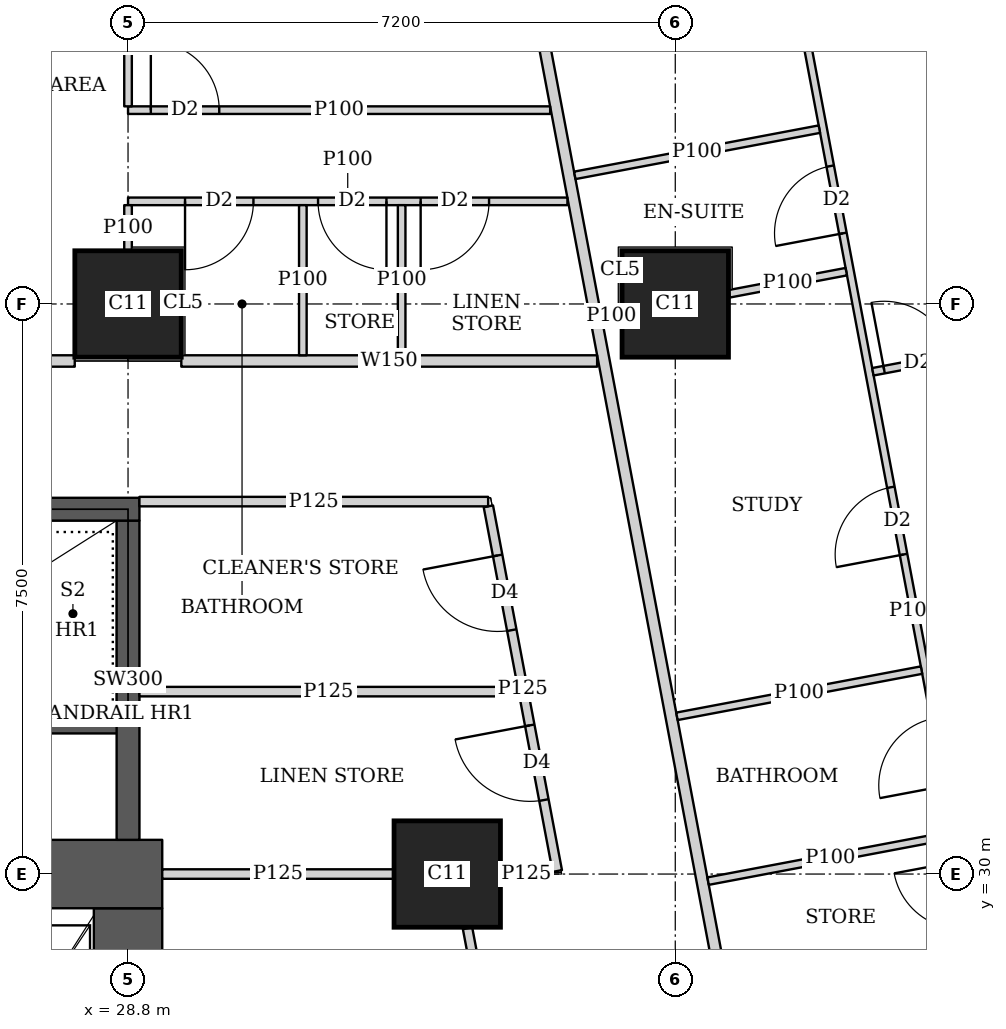
"""IFC4 building model, lengths in metres.
Left out: names, types, materials, properties, quantities, classifications, styles, units other than length and angle.
Written with IfcOpenShell. Run it as: python <this file> out.ifc"""

import sys

from ifc_helpers import new_model, si_unit, direction, frame, frame_2d, origin, origin_2d, place, context, subcontext, project, spatial, rectangle, extrude, element, fill, save


model = new_model("IFC4")
c1 = context("Model", 3, precision=1e-05, world=origin(), true_north=direction((0.0, 1.0)))
c2 = subcontext(c1, "Body", "Model", "MODEL_VIEW")
j1 = project(units=[si_unit("LENGTHUNIT", "METRE"), si_unit("PLANEANGLEUNIT", "RADIAN")], contexts=[c1])
p1 = place(None, origin())
s1 = spatial("IfcSite", under=j1, at=p1, CompositionType="ELEMENT")
p2 = place(p1, origin())
s2 = spatial("IfcBuilding", under=s1, at=p2, CompositionType="ELEMENT")
p3 = place(p2, frame((0.0, 0.0, 289.1)))
s3 = spatial("IfcBuildingStorey", under=s2, at=p3, CompositionType="ELEMENT", Elevation=289.1)
for number, where, z_axis, x_axis in (
    (1, (33.0, 30.0, 0.0), (0.0, 0.0, 1.0), (1.0, 0.0, 0.0)),
    (2, (28.8, 37.5, 0.0), (0.0, 0.0, 1.0), (1.0, 0.0, 0.0)),
    (3, (36.0, 37.5, 0.0), (0.0, 0.0, 1.0), (1.0, 0.0, 0.0)),
):
    element("IfcColumn", number, at=place(p3, frame(where, z_axis=z_axis, x_axis=x_axis)), inside=s3, PredefinedType="COLUMN", context=c2, shape_type="SweptSolid", body=[
        extrude(rectangle(XDim=1.4, YDim=1.4, at=origin_2d()), origin(), (0.0, 0.0, 1.0), 3.75),
    ])
p4 = place(p3, frame((13.95, 30.0, 0.0), z_axis=(0.0, 0.0, 1.0), x_axis=(1.0, 0.0, 0.0)))
e4 = element("IfcWall", 4, at=p4, inside=s3, PredefinedType="SHEAR", context=c2, shape_type="SweptSolid", body=[
    extrude(rectangle(XDim=15.3, YDim=0.9, at=frame_2d((7.65, 0.0))), origin(), (0.0, 0.0, 1.0), 3.75),
])
p5 = place(p4, frame((4.45, 0.0, 0.0)))
e5 = element("IfcOpeningElement", 5, at=p5, cuts=e4, PredefinedType="OPENING", context=c2, shape_type="SweptSolid", body=[
    extrude(rectangle(XDim=1.8, YDim=2.1, at=frame_2d((0.9, 1.05))), frame((0.0, 0.46, 0.0), z_axis=(0.0, -1.0, 0.0), x_axis=(1.0, 0.0, 0.0)), (0.0, 0.0, 1.0), 0.92),
])
p6 = place(p4, frame((10.7, 0.0, 0.0)))
e6 = element("IfcOpeningElement", 6, at=p6, cuts=e4, PredefinedType="OPENING", context=c2, shape_type="SweptSolid", body=[
    extrude(rectangle(XDim=1.1, YDim=2.1, at=frame_2d((0.55, 1.05))), frame((0.0, 0.46, 0.0), z_axis=(0.0, -1.0, 0.0), x_axis=(1.0, 0.0, 0.0)), (0.0, 0.0, 1.0), 0.92),
])
p7 = place(p3, frame((28.8, 15.45, 0.0), z_axis=(0.0, 0.0, 1.0), x_axis=(0.0, 1.0, 0.0)))
e7 = element("IfcWall", 7, at=p7, inside=s3, PredefinedType="SHEAR", context=c2, shape_type="SweptSolid", body=[
    extrude(rectangle(XDim=14.1, YDim=0.9, at=frame_2d((7.05, 0.0))), origin(), (0.0, 0.0, 1.0), 3.75),
])
p8 = place(p3, frame((21.45, 34.8, 0.0), z_axis=(0.0, 0.0, 1.0), x_axis=(1.0, 0.0, 0.0)))
e8 = element("IfcWall", 8, at=p8, inside=s3, PredefinedType="SHEAR", context=c2, shape_type="SweptSolid", body=[
    extrude(rectangle(XDim=7.5, YDim=0.3, at=frame_2d((3.75, 0.0))), origin(), (0.0, 0.0, 1.0), 3.75),
])
p9 = place(p8, frame((0.5, 0.0, 0.0)))
e9 = element("IfcOpeningElement", 9, at=p9, cuts=e8, PredefinedType="OPENING", context=c2, shape_type="SweptSolid", body=[
    extrude(rectangle(XDim=1.1, YDim=2.1, at=frame_2d((0.55, 1.05))), frame((0.0, 0.16, 0.0), z_axis=(0.0, -1.0, 0.0), x_axis=(1.0, 0.0, 0.0)), (0.0, 0.0, 1.0), 0.32),
])
p10 = place(p3, frame((28.8, 30.45, 0.0), z_axis=(0.0, 0.0, 1.0), x_axis=(0.0, 1.0, 0.0)))
e10 = element("IfcWall", 10, at=p10, inside=s3, PredefinedType="SHEAR", context=c2, shape_type="SweptSolid", body=[
    extrude(rectangle(XDim=4.2, YDim=0.3, at=frame_2d((2.1, 0.0))), origin(), (0.0, 0.0, 1.0), 3.75),
])
p11 = place(p3, frame((22.301, 36.75, 0.0), z_axis=(0.0, 0.0, 1.0), x_axis=(1.0, 0.0, 0.0)))
e11 = element("IfcWall", 11, at=p11, inside=s3, PredefinedType="SOLIDWALL", context=c2, shape_type="SweptSolid", body=[
    extrude(rectangle(XDim=5.798, YDim=0.15, at=frame_2d((2.899, 0.0))), origin(), (0.0, 0.0, 1.0), 3.5),
])
p12 = place(p11, frame((4.199, 0.0, 0.0)))
e12 = element("IfcOpeningElement", 12, at=p12, cuts=e11, PredefinedType="OPENING", context=c2, shape_type="SweptSolid", body=[
    extrude(rectangle(XDim=1.0, YDim=2.1, at=frame_2d((0.5, 1.05))), frame((0.0, 0.085, 0.0), z_axis=(0.0, -1.0, 0.0), x_axis=(1.0, 0.0, 0.0)), (0.0, 0.0, 1.0), 0.17),
])
p13 = place(p3, frame((29.501, 36.75, 0.0), z_axis=(0.0, 0.0, 1.0), x_axis=(1.0, 0.0, 0.0)))
e13 = element("IfcWall", 13, at=p13, inside=s3, PredefinedType="SOLIDWALL", context=c2, shape_type="SweptSolid", body=[
    extrude(rectangle(XDim=5.471, YDim=0.15, at=frame_2d((2.735, 0.0))), origin(), (0.0, 0.0, 1.0), 3.5),
])
p14 = place(p3, frame((34.036, 42.186, 0.0), z_axis=(0.0, 0.0, 1.0), x_axis=(0.185593518645, -0.9826266055, 0.0)))
e14 = element("IfcWall", 14, at=p14, inside=s3, PredefinedType="SOLIDWALL", context=c2, shape_type="SweptSolid", body=[
    extrude(rectangle(XDim=35.961, YDim=0.15, at=frame_2d((17.98, 0.0))), origin(), (0.0, 0.0, 1.0), 2.5),
])
p15 = place(p14, frame((19.345, 0.0, 0.0)))
e15 = element("IfcOpeningElement", 15, at=p15, cuts=e14, PredefinedType="OPENING", context=c2, shape_type="SweptSolid", body=[
    extrude(rectangle(XDim=1.0, YDim=2.1, at=frame_2d((0.5, 1.05))), frame((0.0, 0.085, 0.0), z_axis=(0.0, -1.0, 0.0), x_axis=(1.0, 0.0, 0.0)), (0.0, 0.0, 1.0), 0.17),
])
p16 = place(p14, frame((33.774, 0.0, 0.0)))
e16 = element("IfcOpeningElement", 16, at=p16, cuts=e14, PredefinedType="OPENING", context=c2, shape_type="SweptSolid", body=[
    extrude(rectangle(XDim=1.0, YDim=2.1, at=frame_2d((0.5, 1.05))), frame((0.0, 0.085, 0.0), z_axis=(0.0, -1.0, 0.0), x_axis=(1.0, 0.0, 0.0)), (0.0, 0.0, 1.0), 0.17),
])
p17 = place(p3, frame((41.054, 37.072, 0.0), z_axis=(0.0, 0.0, 1.0), x_axis=(-0.982579896219, -0.185840650951, 0.0)))
e17 = element("IfcWall", 17, at=p17, inside=s3, PredefinedType="PARTITIONING", context=c2, shape_type="SweptSolid", body=[
    extrude(rectangle(XDim=2.497, YDim=0.1, at=frame_2d((1.249, 0.0))), origin(), (0.0, 0.0, 1.0), 3.5),
])
p18 = place(p17, frame((1.447, 0.0, 0.0)))
e18 = element("IfcOpeningElement", 18, at=p18, cuts=e17, PredefinedType="OPENING", context=c2, shape_type="SweptSolid", body=[
    extrude(rectangle(XDim=0.9, YDim=2.1, at=frame_2d((0.45, 1.05))), frame((0.0, 0.06, 0.0), z_axis=(0.0, -1.0, 0.0), x_axis=(1.0, 0.0, 0.0)), (0.0, 0.0, 1.0), 0.12),
])
p19 = place(p3, frame((37.896, 39.8, 0.0), z_axis=(0.0, 0.0, 1.0), x_axis=(-0.982607026909, -0.185697147715, 0.0)))
e19 = element("IfcWall", 19, at=p19, inside=s3, PredefinedType="PARTITIONING", context=c2, shape_type="SweptSolid", body=[
    extrude(rectangle(XDim=3.275, YDim=0.1, at=frame_2d((1.637, 0.0))), origin(), (0.0, 0.0, 1.0), 3.5),
])
p20 = place(p3, frame((38.25, 37.925, 0.0), z_axis=(0.0, 0.0, 1.0), x_axis=(-0.982610209589, -0.185680305934, 0.0)))
e20 = element("IfcWall", 20, at=p20, inside=s3, PredefinedType="PARTITIONING", context=c2, shape_type="SweptSolid", body=[
    extrude(rectangle(XDim=1.567, YDim=0.1, at=frame_2d((0.784, 0.0))), origin(), (0.0, 0.0, 1.0), 3.5),
])
p21 = place(p3, frame((35.29, 37.366, 0.0), z_axis=(0.0, 0.0, 1.0), x_axis=(-0.982395465615, -0.18681313963, 0.0)))
e21 = element("IfcWall", 21, at=p21, inside=s3, PredefinedType="PARTITIONING", context=c2, shape_type="SweptSolid", body=[
    extrude(rectangle(XDim=0.263, YDim=0.1, at=frame_2d((0.131, 0.0))), origin(), (0.0, 0.0, 1.0), 3.5),
])
p22 = place(p3, frame((39.24, 32.683, 0.0), z_axis=(0.0, 0.0, 1.0), x_axis=(-0.982607026909, -0.185697147715, 0.0)))
e22 = element("IfcWall", 22, at=p22, inside=s3, PredefinedType="PARTITIONING", context=c2, shape_type="SweptSolid", body=[
    extrude(rectangle(XDim=3.275, YDim=0.1, at=frame_2d((1.637, 0.0))), origin(), (0.0, 0.0, 1.0), 3.5),
])
p23 = place(p3, frame((39.649, 30.515, 0.0), z_axis=(0.0, 0.0, 1.0), x_axis=(-0.982610347627, -0.185679575441, 0.0)))
e23 = element("IfcWall", 23, at=p23, inside=s3, PredefinedType="PARTITIONING", context=c2, shape_type="SweptSolid", body=[
    extrude(rectangle(XDim=3.274, YDim=0.1, at=frame_2d((1.637, 0.0))), origin(), (0.0, 0.0, 1.0), 2.5),
])
p24 = place(p3, frame((37.591, 41.685, 0.0), z_axis=(0.0, 0.0, 1.0), x_axis=(0.185541820726, -0.982636368532, 0.0)))
e24 = element("IfcWall", 24, at=p24, inside=s3, PredefinedType="PARTITIONING", context=c2, shape_type="SweptSolid", body=[
    extrude(rectangle(XDim=16.735, YDim=0.1, at=frame_2d((8.367, 0.0))), origin(), (0.0, 0.0, 1.0), 2.5),
])
p25 = place(p24, frame((2.413, 0.0, 0.0)))
e25 = element("IfcOpeningElement", 25, at=p25, cuts=e24, PredefinedType="OPENING", context=c2, shape_type="SweptSolid", body=[
    extrude(rectangle(XDim=0.9, YDim=2.1, at=frame_2d((0.45, 1.05))), frame((0.0, 0.06, 0.0), z_axis=(0.0, -1.0, 0.0), x_axis=(1.0, 0.0, 0.0)), (0.0, 0.0, 1.0), 0.12),
])
p26 = place(p24, frame((6.713, 0.0, 0.0)))
e26 = element("IfcOpeningElement", 26, at=p26, cuts=e24, PredefinedType="OPENING", context=c2, shape_type="SweptSolid", body=[
    extrude(rectangle(XDim=0.9, YDim=2.1, at=frame_2d((0.45, 1.05))), frame((0.0, 0.06, 0.0), z_axis=(0.0, -1.0, 0.0), x_axis=(1.0, 0.0, 0.0)), (0.0, 0.0, 1.0), 0.12),
])
p27 = place(p24, frame((9.805, 0.0, 0.0)))
e27 = element("IfcOpeningElement", 27, at=p27, cuts=e24, PredefinedType="OPENING", context=c2, shape_type="SweptSolid", body=[
    extrude(rectangle(XDim=0.9, YDim=2.1, at=frame_2d((0.45, 1.05))), frame((0.0, 0.06, 0.0), z_axis=(0.0, -1.0, 0.0), x_axis=(1.0, 0.0, 0.0)), (0.0, 0.0, 1.0), 0.12),
])
p28 = place(p24, frame((11.713, 0.0, 0.0)))
e28 = element("IfcOpeningElement", 28, at=p28, cuts=e24, PredefinedType="OPENING", context=c2, shape_type="SweptSolid", body=[
    extrude(rectangle(XDim=0.9, YDim=2.1, at=frame_2d((0.45, 1.05))), frame((0.0, 0.06, 0.0), z_axis=(0.0, -1.0, 0.0), x_axis=(1.0, 0.0, 0.0)), (0.0, 0.0, 1.0), 0.12),
])
p29 = place(p24, frame((14.426, 0.0, 0.0)))
e29 = element("IfcOpeningElement", 29, at=p29, cuts=e24, PredefinedType="OPENING", context=c2, shape_type="SweptSolid", body=[
    extrude(rectangle(XDim=0.9, YDim=2.1, at=frame_2d((0.45, 1.05))), frame((0.0, 0.06, 0.0), z_axis=(0.0, -1.0, 0.0), x_axis=(1.0, 0.0, 0.0)), (0.0, 0.0, 1.0), 0.12),
])
p30 = place(p3, frame((28.8, 40.1, 0.0), z_axis=(0.0, 0.0, 1.0), x_axis=(0.0, 1.0, 0.0)))
e30 = element("IfcWall", 30, at=p30, inside=s3, PredefinedType="PARTITIONING", context=c2, shape_type="SweptSolid", body=[
    extrude(rectangle(XDim=1.699, YDim=0.1, at=frame_2d((0.85, 0.0))), origin(), (0.0, 0.0, 1.0), 3.5),
])
p31 = place(p3, frame((28.8, 38.201, 0.0), z_axis=(0.0, 0.0, 1.0), x_axis=(0.0, 1.0, 0.0)))
e31 = element("IfcWall", 31, at=p31, inside=s3, PredefinedType="PARTITIONING", context=c2, shape_type="SweptSolid", body=[
    extrude(rectangle(XDim=0.599, YDim=0.1, at=frame_2d((0.3, 0.0))), origin(), (0.0, 0.0, 1.0), 3.5),
])
for number, where, z_axis, x_axis in (
    (32, (32.4, 36.825, 0.0), (0.0, 0.0, 1.0), (0.0, 1.0, 0.0)),
    (33, (31.1, 36.825, 0.0), (0.0, 0.0, 1.0), (0.0, 1.0, 0.0)),
):
    element("IfcWall", number, at=place(p3, frame(where, z_axis=z_axis, x_axis=x_axis)), inside=s3, PredefinedType="PARTITIONING", context=c2, shape_type="SweptSolid", body=[
        extrude(rectangle(XDim=1.975, YDim=0.1, at=frame_2d((0.988, 0.0))), origin(), (0.0, 0.0, 1.0), 3.5),
    ])
p32 = place(p3, frame((28.8, 38.85, 0.0), z_axis=(0.0, 0.0, 1.0), x_axis=(1.0, 0.0, 0.0)))
e34 = element("IfcWall", 34, at=p32, inside=s3, PredefinedType="PARTITIONING", context=c2, shape_type="SweptSolid", body=[
    extrude(rectangle(XDim=5.781, YDim=0.1, at=frame_2d((2.891, 0.0))), origin(), (0.0, 0.0, 1.0), 3.5),
])
p33 = place(p32, frame((0.75, 0.0, 0.0)))
e35 = element("IfcOpeningElement", 35, at=p33, cuts=e34, PredefinedType="OPENING", context=c2, shape_type="SweptSolid", body=[
    extrude(rectangle(XDim=0.9, YDim=2.1, at=frame_2d((0.45, 1.05))), frame((0.0, 0.06, 0.0), z_axis=(0.0, -1.0, 0.0), x_axis=(1.0, 0.0, 0.0)), (0.0, 0.0, 1.0), 0.12),
])
p34 = place(p32, frame((2.5, 0.0, 0.0)))
e36 = element("IfcOpeningElement", 36, at=p34, cuts=e34, PredefinedType="OPENING", context=c2, shape_type="SweptSolid", body=[
    extrude(rectangle(XDim=0.9, YDim=2.1, at=frame_2d((0.45, 1.05))), frame((0.0, 0.06, 0.0), z_axis=(0.0, -1.0, 0.0), x_axis=(1.0, 0.0, 0.0)), (0.0, 0.0, 1.0), 0.12),
])
p35 = place(p32, frame((3.85, 0.0, 0.0)))
e37 = element("IfcOpeningElement", 37, at=p35, cuts=e34, PredefinedType="OPENING", context=c2, shape_type="SweptSolid", body=[
    extrude(rectangle(XDim=0.9, YDim=2.1, at=frame_2d((0.45, 1.05))), frame((0.0, 0.06, 0.0), z_axis=(0.0, -1.0, 0.0), x_axis=(1.0, 0.0, 0.0)), (0.0, 0.0, 1.0), 0.12),
])
p36 = place(p3, frame((28.8, 40.05, 0.0), z_axis=(0.0, 0.0, 1.0), x_axis=(1.0, 0.0, 0.0)))
e38 = element("IfcWall", 38, at=p36, inside=s3, PredefinedType="PARTITIONING", context=c2, shape_type="SweptSolid", body=[
    extrude(rectangle(XDim=5.554, YDim=0.1, at=frame_2d((2.777, 0.0))), origin(), (0.0, 0.0, 1.0), 3.5),
])
p37 = place(p36, frame((0.3, 0.0, 0.0)))
e39 = element("IfcOpeningElement", 39, at=p37, cuts=e38, PredefinedType="OPENING", context=c2, shape_type="SweptSolid", body=[
    extrude(rectangle(XDim=0.9, YDim=2.1, at=frame_2d((0.45, 1.05))), frame((0.0, 0.06, 0.0), z_axis=(0.0, -1.0, 0.0), x_axis=(1.0, 0.0, 0.0)), (0.0, 0.0, 1.0), 0.12),
])
p38 = place(p3, frame((28.95, 34.9, 0.0), z_axis=(0.0, 0.0, 1.0), x_axis=(1.0, 0.0, 0.0)))
e40 = element("IfcWall", 40, at=p38, inside=s3, PredefinedType="PARTITIONING", context=c2, shape_type="SweptSolid", body=[
    extrude(rectangle(XDim=4.588, YDim=0.125, at=frame_2d((2.294, 0.0))), origin(), (0.0, 0.0, 1.0), 3.5),
])
p39 = place(p3, frame((34.448, 30.04, 0.0), z_axis=(0.0, 0.0, 1.0), x_axis=(-0.185749459238, 0.982597139418, 0.0)))
e41 = element("IfcWall", 41, at=p39, inside=s3, PredefinedType="PARTITIONING", context=c2, shape_type="SweptSolid", body=[
    extrude(rectangle(XDim=4.883, YDim=0.125, at=frame_2d((2.441, 0.0))), origin(), (0.0, 0.0, 1.0), 2.5),
])
p40 = place(p39, frame((0.95, 0.0, 0.0)))
e42 = element("IfcOpeningElement", 42, at=p40, cuts=e41, PredefinedType="OPENING", context=c2, shape_type="SweptSolid", body=[
    extrude(rectangle(XDim=1.0, YDim=2.1, at=frame_2d((0.5, 1.05))), frame((0.0, 0.073, 0.0), z_axis=(0.0, -1.0, 0.0), x_axis=(1.0, 0.0, 0.0)), (0.0, 0.0, 1.0), 0.145),
])
p41 = place(p39, frame((3.225, 0.0, 0.0)))
e43 = element("IfcOpeningElement", 43, at=p41, cuts=e41, PredefinedType="OPENING", context=c2, shape_type="SweptSolid", body=[
    extrude(rectangle(XDim=1.0, YDim=2.1, at=frame_2d((0.5, 1.05))), frame((0.0, 0.073, 0.0), z_axis=(0.0, -1.0, 0.0), x_axis=(1.0, 0.0, 0.0)), (0.0, 0.0, 1.0), 0.145),
])
p42 = place(p3, frame((35.83, 15.713, 0.0), z_axis=(0.0, 0.0, 1.0), x_axis=(-0.185534724166, 0.982637708481, 0.0)))
e44 = element("IfcWall", 44, at=p42, inside=s3, PredefinedType="PARTITIONING", context=c2, shape_type="SweptSolid", body=[
    extrude(rectangle(XDim=13.814, YDim=0.125, at=frame_2d((6.907, 0.0))), origin(), (0.0, 0.0, 1.0), 2.5),
])
p43 = place(p42, frame((5.35, 0.0, 0.0)))
e45 = element("IfcOpeningElement", 45, at=p43, cuts=e44, PredefinedType="OPENING", context=c2, shape_type="SweptSolid", body=[
    extrude(rectangle(XDim=1.0, YDim=2.1, at=frame_2d((0.5, 1.05))), frame((0.0, 0.073, 0.0), z_axis=(0.0, -1.0, 0.0), x_axis=(1.0, 0.0, 0.0)), (0.0, 0.0, 1.0), 0.145),
])
p44 = place(p3, frame((29.25, 30.0, 0.0), z_axis=(0.0, 0.0, 1.0), x_axis=(1.0, 0.0, 0.0)))
e46 = element("IfcWall", 46, at=p44, inside=s3, PredefinedType="PARTITIONING", context=c2, shape_type="SweptSolid", body=[
    extrude(rectangle(XDim=3.049, YDim=0.125, at=frame_2d((1.524, 0.0))), origin(), (0.0, 0.0, 1.0), 3.5),
])
p45 = place(p3, frame((33.701, 30.0, 0.0), z_axis=(0.0, 0.0, 1.0), x_axis=(1.0, 0.0, 0.0)))
e47 = element("IfcWall", 47, at=p45, inside=s3, PredefinedType="PARTITIONING", context=c2, shape_type="SweptSolid", body=[
    extrude(rectangle(XDim=0.679, YDim=0.125, at=frame_2d((0.339, 0.0))), origin(), (0.0, 0.0, 1.0), 2.5),
])
p46 = place(p3, frame((28.95, 32.4, 0.0), z_axis=(0.0, 0.0, 1.0), x_axis=(1.0, 0.0, 0.0)))
e48 = element("IfcWall", 48, at=p46, inside=s3, PredefinedType="PARTITIONING", context=c2, shape_type="SweptSolid", body=[
    extrude(rectangle(XDim=4.976, YDim=0.125, at=frame_2d((2.488, 0.0))), origin(), (0.0, 0.0, 1.0), 3.5),
])
p47 = place(p3, frame((23.0, 31.95, 0.0), z_axis=(0.0, 0.0, 1.0), x_axis=(1.0, 0.0, 0.0)))
e49 = element("IfcWall", 49, at=p47, inside=s3, PredefinedType="SHEAR", context=c2, shape_type="SweptSolid", body=[
    extrude(rectangle(XDim=5.8, YDim=0.2, at=frame_2d((2.9, 0.0))), origin(), (0.0, 0.0, 1.0), 3.75),
])
p48 = place(p18, origin())
e50 = element("IfcDoor", 50, at=p48, inside=s3, OperationType="SINGLE_SWING_LEFT", PredefinedType="DOOR", context=c2, shape_type="SweptSolid", body=[
    extrude(rectangle(XDim=0.9, YDim=2.1, at=frame_2d((0.45, 1.05))), frame((0.0, 0.025, 0.0), z_axis=(0.0, -1.0, 0.0), x_axis=(1.0, 0.0, 0.0)), (0.0, 0.0, 1.0), 0.05),
])
fill(e18, e50)
p49 = place(p25, origin())
e51 = element("IfcDoor", 51, at=p49, inside=s3, OperationType="SINGLE_SWING_LEFT", PredefinedType="DOOR", context=c2, shape_type="SweptSolid", body=[
    extrude(rectangle(XDim=0.9, YDim=2.1, at=frame_2d((0.45, 1.05))), frame((0.0, 0.025, 0.0), z_axis=(0.0, -1.0, 0.0), x_axis=(1.0, 0.0, 0.0)), (0.0, 0.0, 1.0), 0.05),
])
fill(e25, e51)
p50 = place(p26, origin())
e52 = element("IfcDoor", 52, at=p50, inside=s3, OperationType="SINGLE_SWING_LEFT", PredefinedType="DOOR", context=c2, shape_type="SweptSolid", body=[
    extrude(rectangle(XDim=0.9, YDim=2.1, at=frame_2d((0.45, 1.05))), frame((0.0, 0.025, 0.0), z_axis=(0.0, -1.0, 0.0), x_axis=(1.0, 0.0, 0.0)), (0.0, 0.0, 1.0), 0.05),
])
fill(e26, e52)
p51 = place(p37, origin())
e53 = element("IfcDoor", 53, at=p51, inside=s3, OperationType="SINGLE_SWING_LEFT", PredefinedType="DOOR", context=c2, shape_type="SweptSolid", body=[
    extrude(rectangle(XDim=0.9, YDim=2.1, at=frame_2d((0.45, 1.05))), frame((0.0, 0.025, 0.0), z_axis=(0.0, -1.0, 0.0), x_axis=(1.0, 0.0, 0.0)), (0.0, 0.0, 1.0), 0.05),
])
fill(e39, e53)
p52 = place(p33, origin())
e54 = element("IfcDoor", 54, at=p52, inside=s3, OperationType="SINGLE_SWING_RIGHT", PredefinedType="DOOR", context=c2, shape_type="SweptSolid", body=[
    extrude(rectangle(XDim=0.9, YDim=2.1, at=frame_2d((0.45, 1.05))), frame((0.0, 0.025, 0.0), z_axis=(0.0, -1.0, 0.0), x_axis=(1.0, 0.0, 0.0)), (0.0, 0.0, 1.0), 0.05),
])
fill(e35, e54)
p53 = place(p34, origin())
e55 = element("IfcDoor", 55, at=p53, inside=s3, OperationType="SINGLE_SWING_LEFT", PredefinedType="DOOR", context=c2, shape_type="SweptSolid", body=[
    extrude(rectangle(XDim=0.9, YDim=2.1, at=frame_2d((0.45, 1.05))), frame((0.0, 0.025, 0.0), z_axis=(0.0, -1.0, 0.0), x_axis=(1.0, 0.0, 0.0)), (0.0, 0.0, 1.0), 0.05),
])
fill(e36, e55)
p54 = place(p35, origin())
e56 = element("IfcDoor", 56, at=p54, inside=s3, OperationType="SINGLE_SWING_RIGHT", PredefinedType="DOOR", context=c2, shape_type="SweptSolid", body=[
    extrude(rectangle(XDim=0.9, YDim=2.1, at=frame_2d((0.45, 1.05))), frame((0.0, 0.025, 0.0), z_axis=(0.0, -1.0, 0.0), x_axis=(1.0, 0.0, 0.0)), (0.0, 0.0, 1.0), 0.05),
])
fill(e37, e56)
p55 = place(p40, origin())
e57 = element("IfcDoor", 57, at=p55, inside=s3, OperationType="SINGLE_SWING_RIGHT", PredefinedType="DOOR", context=c2, shape_type="SweptSolid", body=[
    extrude(rectangle(XDim=1.0, YDim=2.1, at=frame_2d((0.5, 1.05))), frame((0.0, 0.025, 0.0), z_axis=(0.0, -1.0, 0.0), x_axis=(1.0, 0.0, 0.0)), (0.0, 0.0, 1.0), 0.05),
])
fill(e42, e57)
p56 = place(p41, origin())
e58 = element("IfcDoor", 58, at=p56, inside=s3, OperationType="SINGLE_SWING_RIGHT", PredefinedType="DOOR", context=c2, shape_type="SweptSolid", body=[
    extrude(rectangle(XDim=1.0, YDim=2.1, at=frame_2d((0.5, 1.05))), frame((0.0, 0.025, 0.0), z_axis=(0.0, -1.0, 0.0), x_axis=(1.0, 0.0, 0.0)), (0.0, 0.0, 1.0), 0.05),
])
fill(e43, e58)
save(model, sys.argv[1])
